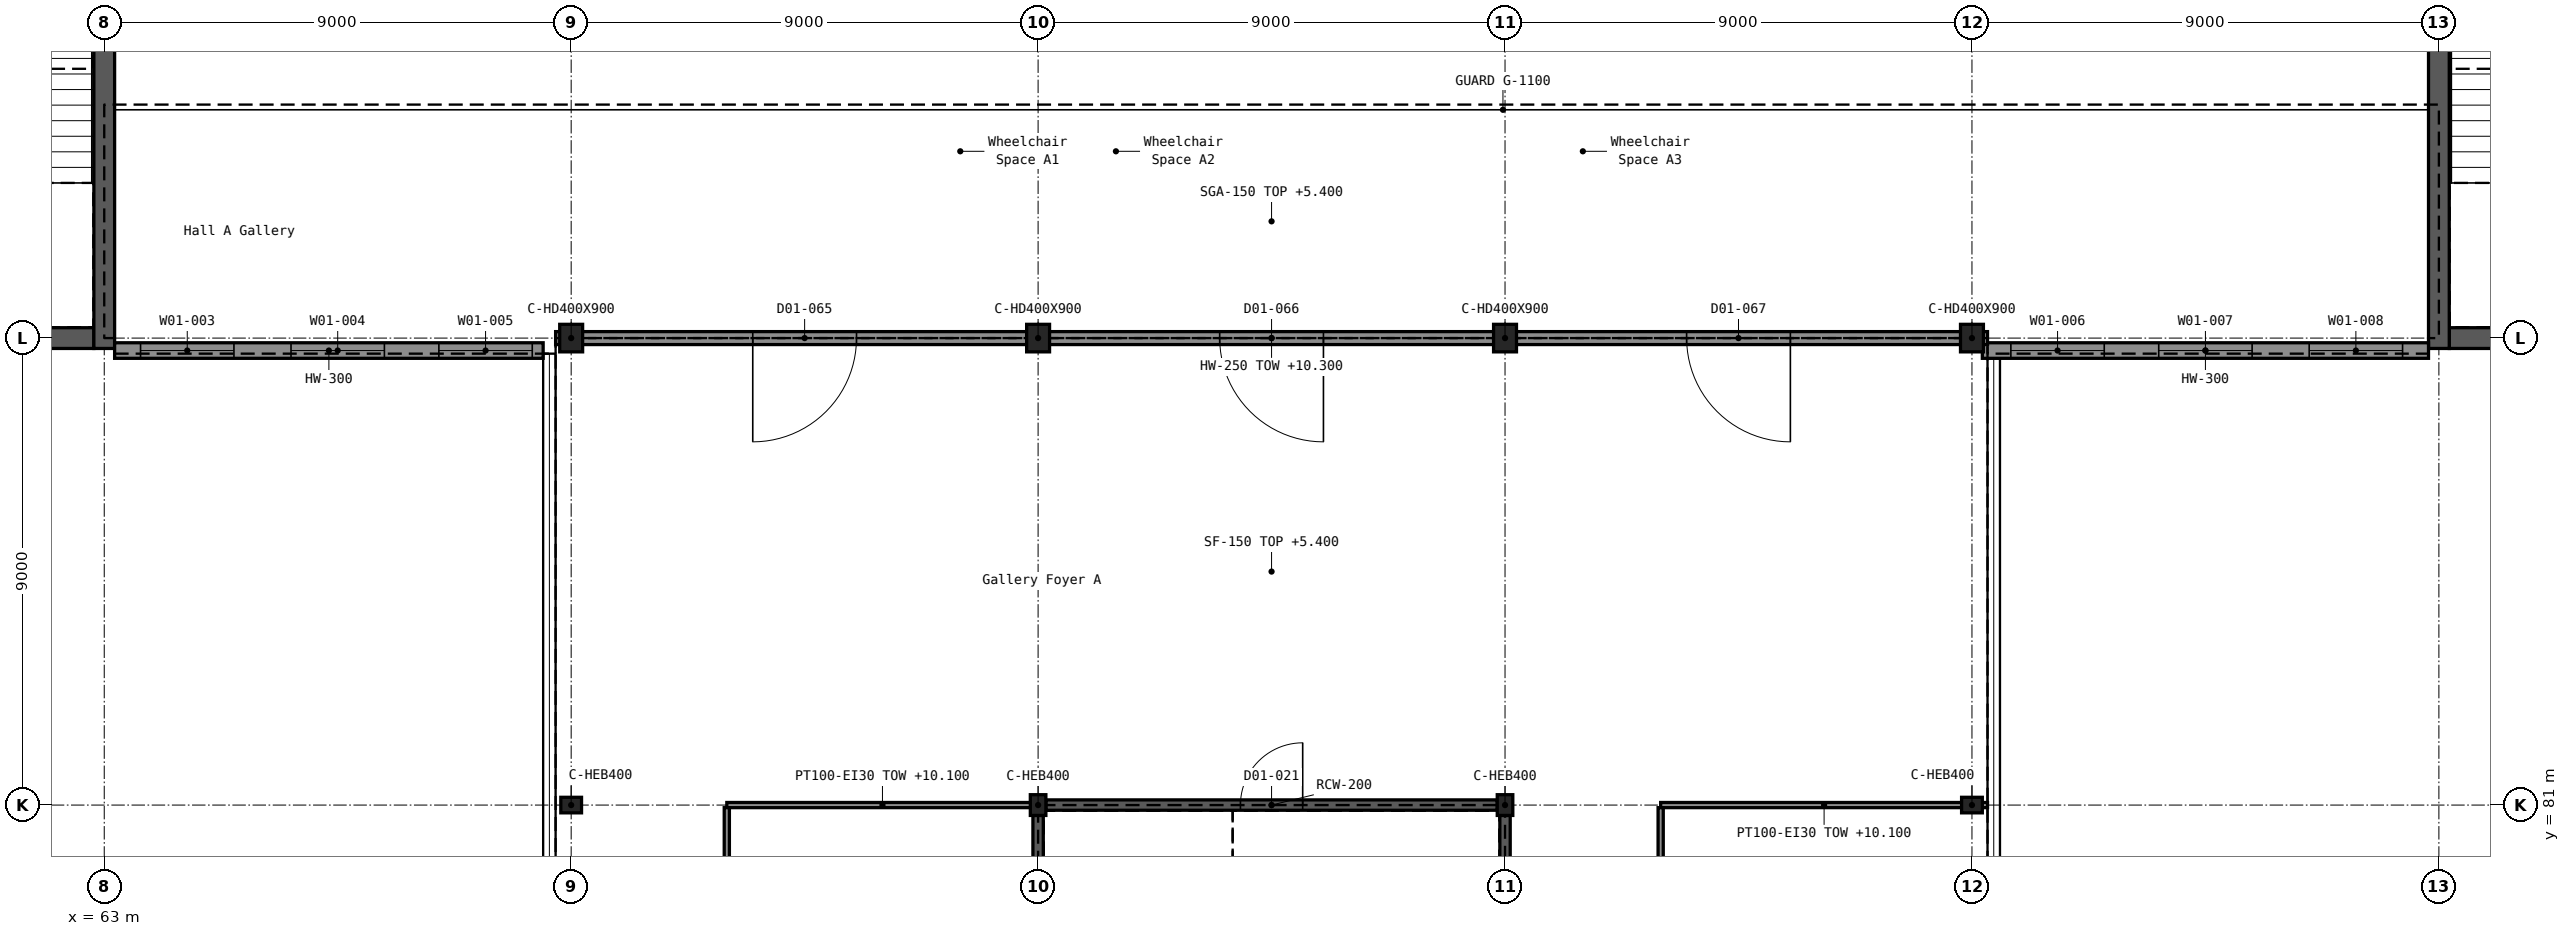
"""IFC4 building model, lengths in metres.
Left out: names, types, materials, properties, quantities, classifications, styles, units other than length and angle.
Written with IfcOpenShell. Run it as: python <this file> out.ifc"""

import sys

from ifc_helpers import new_model, si_unit, direction, frame, frame_2d, origin, origin_2d, place, context, subcontext, project, spatial, rectangle, i_section, extrude, element, fill, save


model = new_model("IFC4")
c1 = context("Model", 3, precision=1e-05, world=origin(), true_north=direction((0.0, 1.0)))
c2 = subcontext(c1, "Body", "Model", "MODEL_VIEW")
j1 = project(units=[si_unit("LENGTHUNIT", "METRE"), si_unit("PLANEANGLEUNIT", "RADIAN")], contexts=[c1])
p1 = place(None, origin())
s1 = spatial("IfcSite", under=j1, at=p1, CompositionType="ELEMENT")
p2 = place(p1, origin())
s2 = spatial("IfcBuilding", under=s1, at=p2, CompositionType="ELEMENT")
p3 = place(p2, frame((0.0, 0.0, 5.4)))
s3 = spatial("IfcBuildingStorey", under=s2, at=p3, CompositionType="ELEMENT", Elevation=5.4)
for number, where, z_axis, x_axis in (
    (1, (72.0, 81.0, 0.0), (0.0, 0.0, 1.0), (0.0, 1.0, 0.0)),
    (2, (81.0, 81.0, 0.0), (0.0, 0.0, 1.0), (1.0, 0.0, 0.0)),
    (3, (90.0, 81.0, 0.0), (0.0, 0.0, 1.0), (1.0, 0.0, 0.0)),
    (4, (99.0, 81.0, 0.0), (0.0, 0.0, 1.0), (0.0, 1.0, 0.0)),
):
    element("IfcColumn", number, at=place(p3, frame(where, z_axis=z_axis, x_axis=x_axis)), inside=s3, PredefinedType="COLUMN", context=c2, shape_type="SweptSolid", body=[
        extrude(i_section(OverallWidth=0.3, OverallDepth=0.4, WebThickness=0.013, FlangeThickness=0.024, FilletRadius=0.027, at=origin_2d()), origin(), (0.0, 0.0, 1.0), 5.4),
    ])
for number, where, z_axis, x_axis in (
    (5, (72.0, 90.0, 0.0), (0.0, 0.0, 1.0), (1.0, 0.0, 0.0)),
    (6, (81.0, 90.0, 0.0), (0.0, 0.0, 1.0), (1.0, 0.0, 0.0)),
    (7, (90.0, 90.0, 0.0), (0.0, 0.0, 1.0), (1.0, 0.0, 0.0)),
    (8, (99.0, 90.0, 0.0), (0.0, 0.0, 1.0), (1.0, 0.0, 0.0)),
):
    element("IfcColumn", number, at=place(p3, frame(where, z_axis=z_axis, x_axis=x_axis)), inside=s3, PredefinedType="COLUMN", context=c2, shape_type="SweptSolid", body=[
        extrude(i_section(OverallWidth=0.442, OverallDepth=0.531, WebThickness=0.066, FlangeThickness=0.106, FilletRadius=0.015, at=origin_2d()), origin(), (0.0, 0.0, 1.0), 5.4),
    ])
p4 = place(p3, frame((54.2, 90.0, 0.0), z_axis=(0.0, 0.0, 1.0), x_axis=(1.0, 0.0, 0.0)))
e9 = element("IfcWall", 9, at=p4, inside=s3, PredefinedType="SHEAR", context=c2, shape_type="SweptSolid", body=[
    extrude(rectangle(XDim=8.6, YDim=0.4, at=frame_2d((4.3, 0.0))), origin(), (0.0, 0.0, 1.0), 5.4),
])
p5 = place(p4, frame((3.9, 0.0, 1.5)))
e10 = element("IfcOpeningElement", 10, at=p5, cuts=e9, PredefinedType="OPENING", context=c2, shape_type="SweptSolid", body=[
    extrude(rectangle(XDim=1.2, YDim=1.8, at=frame_2d((0.6, 0.9))), frame((0.0, 0.211, 0.0), z_axis=(0.0, -1.0, 0.0), x_axis=(1.0, 0.0, 0.0)), (0.0, 0.0, 1.0), 0.422),
])
p6 = place(p3, frame((63.0, 89.8, 0.0), z_axis=(0.0, 0.0, 1.0), x_axis=(0.0, 1.0, 0.0)))
e11 = element("IfcWall", 11, at=p6, inside=s3, PredefinedType="SHEAR", context=c2, shape_type="SweptSolid", body=[
    extrude(rectangle(XDim=27.4, YDim=0.4, at=frame_2d((13.7, 0.0))), origin(), (0.0, 0.0, 1.0), 5.4),
])
p7 = place(p3, frame((108.2, 90.0, 0.0), z_axis=(0.0, 0.0, 1.0), x_axis=(1.0, 0.0, 0.0)))
e12 = element("IfcWall", 12, at=p7, inside=s3, PredefinedType="SHEAR", context=c2, shape_type="SweptSolid", body=[
    extrude(rectangle(XDim=8.6, YDim=0.4, at=frame_2d((4.3, 0.0))), origin(), (0.0, 0.0, 1.0), 5.4),
])
p8 = place(p7, frame((3.9, 0.0, 1.5)))
e13 = element("IfcOpeningElement", 13, at=p8, cuts=e12, PredefinedType="OPENING", context=c2, shape_type="SweptSolid", body=[
    extrude(rectangle(XDim=1.2, YDim=1.8, at=frame_2d((0.6, 0.9))), frame((0.0, 0.211, 0.0), z_axis=(0.0, -1.0, 0.0), x_axis=(1.0, 0.0, 0.0)), (0.0, 0.0, 1.0), 0.422),
])
p9 = place(p3, frame((108.0, 89.8, 0.0), z_axis=(0.0, 0.0, 1.0), x_axis=(0.0, 1.0, 0.0)))
e14 = element("IfcWall", 14, at=p9, inside=s3, PredefinedType="SHEAR", context=c2, shape_type="SweptSolid", body=[
    extrude(rectangle(XDim=27.4, YDim=0.4, at=frame_2d((13.7, 0.0))), origin(), (0.0, 0.0, 1.0), 5.4),
])
p10 = place(p3, frame((63.2, 89.76, 0.0), z_axis=(0.0, 0.0, 1.0), x_axis=(1.0, 0.0, 0.0)))
e15 = element("IfcWall", 15, at=p10, inside=s3, PredefinedType="SOLIDWALL", context=c2, shape_type="SweptSolid", body=[
    extrude(rectangle(XDim=8.26, YDim=0.3, at=frame_2d((4.13, 0.0))), origin(), (0.0, 0.0, 1.0), 5.4),
])
p11 = place(p10, frame((0.5, 0.0, 3.3)))
e16 = element("IfcOpeningElement", 16, at=p11, cuts=e15, PredefinedType="OPENING", context=c2, shape_type="SweptSolid", body=[
    extrude(rectangle(XDim=1.8, YDim=1.5, at=frame_2d((0.9, 0.75))), frame((0.0, 0.161, 0.0), z_axis=(0.0, -1.0, 0.0), x_axis=(1.0, 0.0, 0.0)), (0.0, 0.0, 1.0), 0.322),
])
p12 = place(p10, frame((3.4, 0.0, 3.3)))
e17 = element("IfcOpeningElement", 17, at=p12, cuts=e15, PredefinedType="OPENING", context=c2, shape_type="SweptSolid", body=[
    extrude(rectangle(XDim=1.8, YDim=1.5, at=frame_2d((0.9, 0.75))), frame((0.0, 0.161, 0.0), z_axis=(0.0, -1.0, 0.0), x_axis=(1.0, 0.0, 0.0)), (0.0, 0.0, 1.0), 0.322),
])
p13 = place(p10, frame((6.25, 0.0, 3.3)))
e18 = element("IfcOpeningElement", 18, at=p13, cuts=e15, PredefinedType="OPENING", context=c2, shape_type="SweptSolid", body=[
    extrude(rectangle(XDim=1.8, YDim=1.5, at=frame_2d((0.9, 0.75))), frame((0.0, 0.161, 0.0), z_axis=(0.0, -1.0, 0.0), x_axis=(1.0, 0.0, 0.0)), (0.0, 0.0, 1.0), 0.322),
])
p14 = place(p3, frame((99.2, 89.76, 0.0), z_axis=(0.0, 0.0, 1.0), x_axis=(1.0, 0.0, 0.0)))
e19 = element("IfcWall", 19, at=p14, inside=s3, PredefinedType="SOLIDWALL", context=c2, shape_type="SweptSolid", body=[
    extrude(rectangle(XDim=8.6, YDim=0.3, at=frame_2d((4.3, 0.0))), origin(), (0.0, 0.0, 1.0), 5.4),
])
p15 = place(p14, frame((0.55, 0.0, 3.3)))
e20 = element("IfcOpeningElement", 20, at=p15, cuts=e19, PredefinedType="OPENING", context=c2, shape_type="SweptSolid", body=[
    extrude(rectangle(XDim=1.8, YDim=1.5, at=frame_2d((0.9, 0.75))), frame((0.0, 0.161, 0.0), z_axis=(0.0, -1.0, 0.0), x_axis=(1.0, 0.0, 0.0)), (0.0, 0.0, 1.0), 0.322),
])
p16 = place(p14, frame((3.4, 0.0, 3.3)))
e21 = element("IfcOpeningElement", 21, at=p16, cuts=e19, PredefinedType="OPENING", context=c2, shape_type="SweptSolid", body=[
    extrude(rectangle(XDim=1.8, YDim=1.5, at=frame_2d((0.9, 0.75))), frame((0.0, 0.161, 0.0), z_axis=(0.0, -1.0, 0.0), x_axis=(1.0, 0.0, 0.0)), (0.0, 0.0, 1.0), 0.322),
])
p17 = place(p14, frame((6.3, 0.0, 3.3)))
e22 = element("IfcOpeningElement", 22, at=p17, cuts=e19, PredefinedType="OPENING", context=c2, shape_type="SweptSolid", body=[
    extrude(rectangle(XDim=1.8, YDim=1.5, at=frame_2d((0.9, 0.75))), frame((0.0, 0.161, 0.0), z_axis=(0.0, -1.0, 0.0), x_axis=(1.0, 0.0, 0.0)), (0.0, 0.0, 1.0), 0.322),
])
p18 = place(p3, frame((81.15, 81.0, 0.0), z_axis=(0.0, 0.0, 1.0), x_axis=(1.0, 0.0, 0.0)))
e23 = element("IfcWall", 23, at=p18, inside=s3, PredefinedType="SHEAR", context=c2, shape_type="SweptSolid", body=[
    extrude(rectangle(XDim=8.7, YDim=0.2, at=frame_2d((4.35, 0.0))), origin(), (0.0, 0.0, 1.0), 5.4),
])
p19 = place(p18, frame((3.75, 0.0, 0.0)))
e24 = element("IfcOpeningElement", 24, at=p19, cuts=e23, PredefinedType="OPENING", context=c2, shape_type="SweptSolid", body=[
    extrude(rectangle(XDim=1.2, YDim=2.1, at=frame_2d((0.6, 1.05))), frame((0.0, 0.111, 0.0), z_axis=(0.0, -1.0, 0.0), x_axis=(1.0, 0.0, 0.0)), (0.0, 0.0, 1.0), 0.222),
])
for number, where, z_axis, x_axis in (
    (25, (81.0, 72.2, 0.0), (0.0, 0.0, 1.0), (0.0, 1.0, 0.0)),
    (26, (90.0, 72.2, 0.0), (0.0, 0.0, 1.0), (0.0, 1.0, 0.0)),
):
    element("IfcWall", number, at=place(p3, frame(where, z_axis=z_axis, x_axis=x_axis)), inside=s3, PredefinedType="SHEAR", context=c2, shape_type="SweptSolid", body=[
        extrude(rectangle(XDim=8.6, YDim=0.2, at=frame_2d((4.3, 0.0))), origin(), (0.0, 0.0, 1.0), 5.4),
    ])
p20 = place(p3, frame((71.7, 90.0, 0.0), z_axis=(0.0, 0.0, 1.0), x_axis=(1.0, 0.0, 0.0)))
e27 = element("IfcWall", 27, at=p20, inside=s3, PredefinedType="SOLIDWALL", context=c2, shape_type="SweptSolid", body=[
    extrude(rectangle(XDim=27.6, YDim=0.25, at=frame_2d((13.8, 0.0))), origin(), (0.0, 0.0, 1.0), 4.9),
])
p21 = place(p20, frame((3.8, 0.0, 0.0)))
e28 = element("IfcOpeningElement", 28, at=p21, cuts=e27, PredefinedType="OPENING", context=c2, shape_type="SweptSolid", body=[
    extrude(rectangle(XDim=2.0, YDim=2.4, at=frame_2d((1.0, 1.2))), frame((0.0, 0.136, 0.0), z_axis=(0.0, -1.0, 0.0), x_axis=(1.0, 0.0, 0.0)), (0.0, 0.0, 1.0), 0.272),
])
p22 = place(p20, frame((12.8, 0.0, 0.0)))
e29 = element("IfcOpeningElement", 29, at=p22, cuts=e27, PredefinedType="OPENING", context=c2, shape_type="SweptSolid", body=[
    extrude(rectangle(XDim=2.0, YDim=2.4, at=frame_2d((1.0, 1.2))), frame((0.0, 0.136, 0.0), z_axis=(0.0, -1.0, 0.0), x_axis=(1.0, 0.0, 0.0)), (0.0, 0.0, 1.0), 0.272),
])
p23 = place(p20, frame((21.8, 0.0, 0.0)))
e30 = element("IfcOpeningElement", 30, at=p23, cuts=e27, PredefinedType="OPENING", context=c2, shape_type="SweptSolid", body=[
    extrude(rectangle(XDim=2.0, YDim=2.4, at=frame_2d((1.0, 1.2))), frame((0.0, 0.136, 0.0), z_axis=(0.0, -1.0, 0.0), x_axis=(1.0, 0.0, 0.0)), (0.0, 0.0, 1.0), 0.272),
])
p24 = place(p3, frame((75.0, 81.0, 0.0), z_axis=(0.0, 0.0, 1.0), x_axis=(1.0, 0.0, 0.0)))
e31 = element("IfcWall", 31, at=p24, inside=s3, PredefinedType="PARTITIONING", context=c2, shape_type="SweptSolid", body=[
    extrude(rectangle(XDim=6.0, YDim=0.1, at=frame_2d((3.0, 0.0))), origin(), (0.0, 0.0, 1.0), 4.7),
])
p25 = place(p3, frame((93.0, 81.0, 0.0), z_axis=(0.0, 0.0, 1.0), x_axis=(1.0, 0.0, 0.0)))
e32 = element("IfcWall", 32, at=p25, inside=s3, PredefinedType="PARTITIONING", context=c2, shape_type="SweptSolid", body=[
    extrude(rectangle(XDim=6.3, YDim=0.1, at=frame_2d((3.15, 0.0))), origin(), (0.0, 0.0, 1.0), 4.7),
])
p26 = place(p3, frame((75.0, 72.075, 0.0), z_axis=(0.0, 0.0, 1.0), x_axis=(0.0, 1.0, 0.0)))
e33 = element("IfcWall", 33, at=p26, inside=s3, PredefinedType="PARTITIONING", context=c2, shape_type="SweptSolid", body=[
    extrude(rectangle(XDim=8.875, YDim=0.1, at=frame_2d((4.438, 0.0))), origin(), (0.0, 0.0, 1.0), 4.85),
])
p27 = place(p26, frame((3.525, 0.0, 0.0)))
e34 = element("IfcOpeningElement", 34, at=p27, cuts=e33, PredefinedType="OPENING", context=c2, shape_type="SweptSolid", body=[
    extrude(rectangle(XDim=1.8, YDim=2.1, at=frame_2d((0.9, 1.05))), frame((0.0, 0.061, 0.0), z_axis=(0.0, -1.0, 0.0), x_axis=(1.0, 0.0, 0.0)), (0.0, 0.0, 1.0), 0.122),
])
p28 = place(p3, frame((93.0, 72.05, 0.0), z_axis=(0.0, 0.0, 1.0), x_axis=(0.0, 1.0, 0.0)))
e35 = element("IfcWall", 35, at=p28, inside=s3, PredefinedType="PARTITIONING", context=c2, shape_type="SweptSolid", body=[
    extrude(rectangle(XDim=8.9, YDim=0.1, at=frame_2d((4.45, 0.0))), origin(), (0.0, 0.0, 1.0), 4.85),
])
p29 = place(p28, frame((3.95, 0.0, 0.0)))
e36 = element("IfcOpeningElement", 36, at=p29, cuts=e35, PredefinedType="OPENING", context=c2, shape_type="SweptSolid", body=[
    extrude(rectangle(XDim=1.0, YDim=2.1, at=frame_2d((0.5, 1.05))), frame((0.0, 0.061, 0.0), z_axis=(0.0, -1.0, 0.0), x_axis=(1.0, 0.0, 0.0)), (0.0, 0.0, 1.0), 0.122),
])
p30 = place(p11, origin())
e37 = element("IfcWindow", 37, at=p30, inside=s3, PartitioningType="SINGLE_PANEL", PredefinedType="WINDOW", context=c2, shape_type="SweptSolid", body=[
    extrude(rectangle(XDim=1.8, YDim=1.5, at=frame_2d((0.9, 0.75))), frame((0.0, 0.03, 0.0), z_axis=(0.0, -1.0, 0.0), x_axis=(1.0, 0.0, 0.0)), (0.0, 0.0, 1.0), 0.06),
])
fill(e16, e37)
p31 = place(p12, origin())
e38 = element("IfcWindow", 38, at=p31, inside=s3, PartitioningType="SINGLE_PANEL", PredefinedType="WINDOW", context=c2, shape_type="SweptSolid", body=[
    extrude(rectangle(XDim=1.8, YDim=1.5, at=frame_2d((0.9, 0.75))), frame((0.0, 0.03, 0.0), z_axis=(0.0, -1.0, 0.0), x_axis=(1.0, 0.0, 0.0)), (0.0, 0.0, 1.0), 0.06),
])
fill(e17, e38)
p32 = place(p13, origin())
e39 = element("IfcWindow", 39, at=p32, inside=s3, PartitioningType="SINGLE_PANEL", PredefinedType="WINDOW", context=c2, shape_type="SweptSolid", body=[
    extrude(rectangle(XDim=1.8, YDim=1.5, at=frame_2d((0.9, 0.75))), frame((0.0, 0.03, 0.0), z_axis=(0.0, -1.0, 0.0), x_axis=(1.0, 0.0, 0.0)), (0.0, 0.0, 1.0), 0.06),
])
fill(e18, e39)
p33 = place(p15, origin())
e40 = element("IfcWindow", 40, at=p33, inside=s3, PartitioningType="SINGLE_PANEL", PredefinedType="WINDOW", context=c2, shape_type="SweptSolid", body=[
    extrude(rectangle(XDim=1.8, YDim=1.5, at=frame_2d((0.9, 0.75))), frame((0.0, 0.03, 0.0), z_axis=(0.0, -1.0, 0.0), x_axis=(1.0, 0.0, 0.0)), (0.0, 0.0, 1.0), 0.06),
])
fill(e20, e40)
p34 = place(p16, origin())
e41 = element("IfcWindow", 41, at=p34, inside=s3, PartitioningType="SINGLE_PANEL", PredefinedType="WINDOW", context=c2, shape_type="SweptSolid", body=[
    extrude(rectangle(XDim=1.8, YDim=1.5, at=frame_2d((0.9, 0.75))), frame((0.0, 0.03, 0.0), z_axis=(0.0, -1.0, 0.0), x_axis=(1.0, 0.0, 0.0)), (0.0, 0.0, 1.0), 0.06),
])
fill(e21, e41)
p35 = place(p17, origin())
e42 = element("IfcWindow", 42, at=p35, inside=s3, PartitioningType="SINGLE_PANEL", PredefinedType="WINDOW", context=c2, shape_type="SweptSolid", body=[
    extrude(rectangle(XDim=1.8, YDim=1.5, at=frame_2d((0.9, 0.75))), frame((0.0, 0.03, 0.0), z_axis=(0.0, -1.0, 0.0), x_axis=(1.0, 0.0, 0.0)), (0.0, 0.0, 1.0), 0.06),
])
fill(e22, e42)
p36 = place(p19, origin())
e43 = element("IfcDoor", 43, at=p36, inside=s3, OperationType="SINGLE_SWING_RIGHT", PredefinedType="DOOR", context=c2, shape_type="SweptSolid", body=[
    extrude(rectangle(XDim=1.2, YDim=2.1, at=frame_2d((0.6, 1.05))), frame((0.0, 0.025, 0.0), z_axis=(0.0, -1.0, 0.0), x_axis=(1.0, 0.0, 0.0)), (0.0, 0.0, 1.0), 0.05),
])
fill(e24, e43)
p37 = place(p21, frame((2.0, 0.0, 0.0), z_axis=(0.0, 0.0, 1.0), x_axis=(-1.0, 0.0, 0.0)))
e44 = element("IfcDoor", 44, at=p37, inside=s3, OperationType="DOUBLE_DOOR_SINGLE_SWING", PredefinedType="DOOR", context=c2, shape_type="SweptSolid", body=[
    extrude(rectangle(XDim=2.0, YDim=2.4, at=frame_2d((1.0, 1.2))), frame((0.0, 0.025, 0.0), z_axis=(0.0, -1.0, 0.0), x_axis=(1.0, 0.0, 0.0)), (0.0, 0.0, 1.0), 0.05),
])
fill(e28, e44)
p38 = place(p22, frame((2.0, 0.0, 0.0), z_axis=(0.0, 0.0, 1.0), x_axis=(-1.0, 0.0, 0.0)))
e45 = element("IfcDoor", 45, at=p38, inside=s3, OperationType="DOUBLE_DOOR_SINGLE_SWING", PredefinedType="DOOR", context=c2, shape_type="SweptSolid", body=[
    extrude(rectangle(XDim=2.0, YDim=2.4, at=frame_2d((1.0, 1.2))), frame((0.0, 0.025, 0.0), z_axis=(0.0, -1.0, 0.0), x_axis=(1.0, 0.0, 0.0)), (0.0, 0.0, 1.0), 0.05),
])
fill(e29, e45)
p39 = place(p23, frame((2.0, 0.0, 0.0), z_axis=(0.0, 0.0, 1.0), x_axis=(-1.0, 0.0, 0.0)))
e46 = element("IfcDoor", 46, at=p39, inside=s3, OperationType="DOUBLE_DOOR_SINGLE_SWING", PredefinedType="DOOR", context=c2, shape_type="SweptSolid", body=[
    extrude(rectangle(XDim=2.0, YDim=2.4, at=frame_2d((1.0, 1.2))), frame((0.0, 0.025, 0.0), z_axis=(0.0, -1.0, 0.0), x_axis=(1.0, 0.0, 0.0)), (0.0, 0.0, 1.0), 0.05),
])
fill(e30, e46)
save(model, sys.argv[1])
